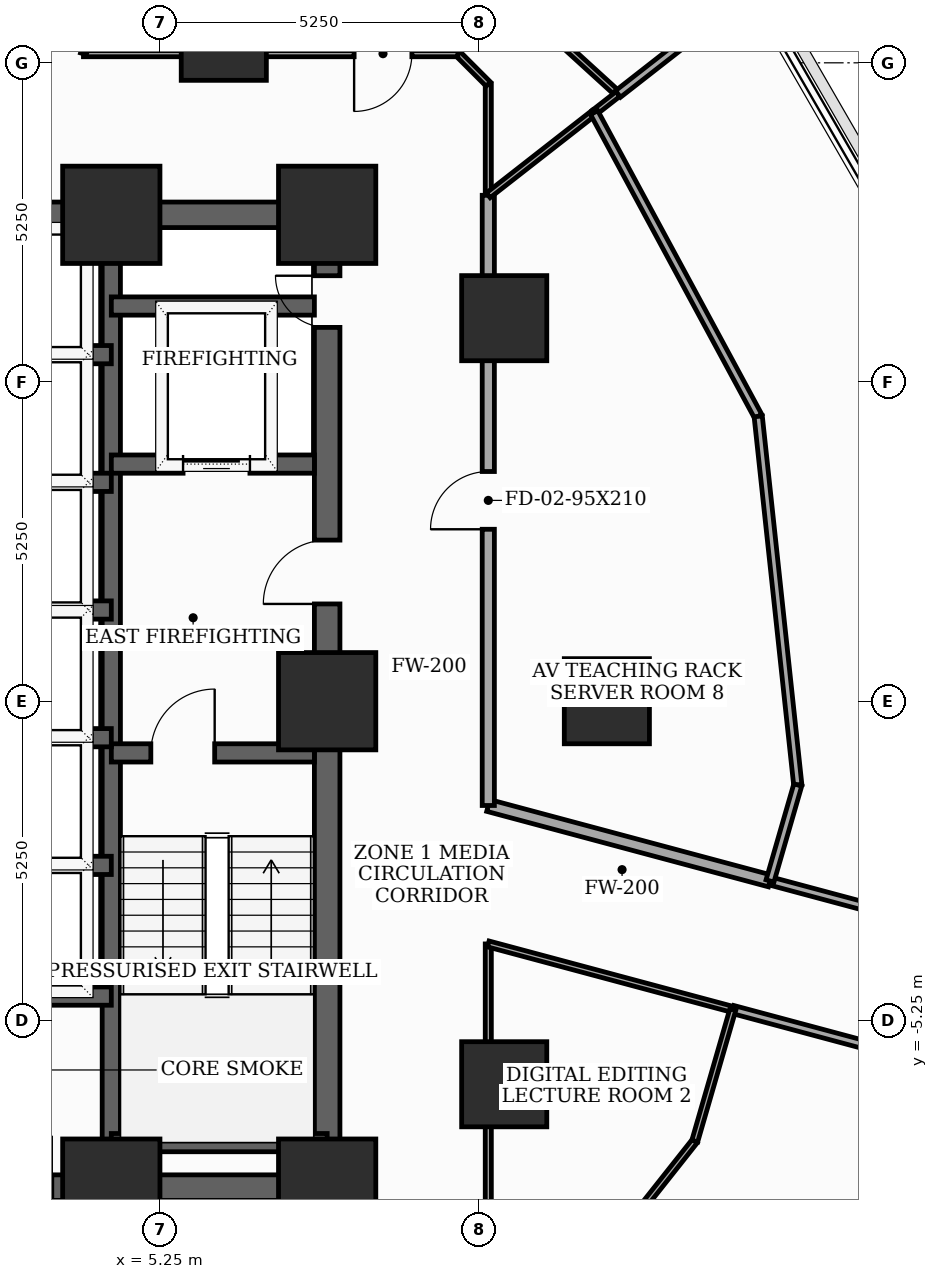
"""IFC4 building model, lengths in metres.
Left out: names, types, materials, properties, quantities, classifications, styles, units other than length and angle.
Written with IfcOpenShell. Run it as: python <this file> out.ifc"""

import sys

from ifc_helpers import new_model, si_unit, direction, frame, frame_2d, origin, origin_2d, place, context, subcontext, project, spatial, rectangle, extrude, element, fill, save


model = new_model("IFC4")
c1 = context("Model", 3, precision=1e-05, world=origin(), true_north=direction((0.0, 1.0)))
c2 = subcontext(c1, "Body", "Model", "MODEL_VIEW")
j1 = project(units=[si_unit("LENGTHUNIT", "METRE"), si_unit("PLANEANGLEUNIT", "RADIAN")], contexts=[c1])
p1 = place(None, origin())
s1 = spatial("IfcSite", under=j1, at=p1, CompositionType="ELEMENT")
p2 = place(p1, origin())
s2 = spatial("IfcBuilding", under=s1, at=p2, CompositionType="ELEMENT")
p3 = place(p2, frame((0.0, 0.0, 48.2)))
s3 = spatial("IfcBuildingStorey", under=s2, at=p3, CompositionType="ELEMENT", Elevation=48.2)
for number, where, z_axis, x_axis in (
    (1, (4.45, -8.0, 0.0), (0.0, 0.0, 1.0), (1.0, 0.0, 0.0)),
    (2, (8.0, -8.0, 0.0), (0.0, 0.0, 1.0), (1.0, 0.0, 0.0)),
    (3, (8.0, 0.0, 0.0), (0.0, 0.0, 1.0), (1.0, 0.0, 0.0)),
    (4, (8.0, 8.0, 0.0), (0.0, 0.0, 1.0), (1.0, 0.0, 0.0)),
    (5, (4.45, 8.0, 0.0), (0.0, 0.0, 1.0), (1.0, 0.0, 0.0)),
):
    element("IfcColumn", number, at=place(p3, frame(where, z_axis=z_axis, x_axis=x_axis)), inside=s3, PredefinedType="COLUMN", context=c2, shape_type="SweptSolid", body=[
        extrude(rectangle(XDim=1.6, YDim=1.6, at=origin_2d()), origin(), (0.0, 0.0, 1.0), 3.7),
    ])
for number, where, z_axis, x_axis in (
    (6, (12.6, 0.0, 0.0), (0.0, 0.0, 1.0), (1.0, 0.0, 0.0)),
    (7, (10.912, 6.3, 0.0), (0.0, 0.0, 1.0), (1.0, 0.0, 0.0)),
    (8, (6.3, 10.912, 0.0), (0.0, 0.0, 1.0), (1.0, 0.0, 0.0)),
    (9, (10.912, -6.3, 0.0), (0.0, 0.0, 1.0), (1.0, 0.0, 0.0)),
):
    element("IfcColumn", number, at=place(p3, frame(where, z_axis=z_axis, x_axis=x_axis)), inside=s3, PredefinedType="COLUMN", context=c2, shape_type="SweptSolid", body=[
        extrude(rectangle(XDim=1.4, YDim=1.4, at=origin_2d()), origin(), (0.0, 0.0, 1.0), 3.7),
    ])
p4 = place(p3, frame((8.0, -8.0, 0.0), z_axis=(0.0, 0.0, 1.0), x_axis=(0.0, 1.0, 0.0)))
e10 = element("IfcWall", 10, at=p4, inside=s3, PredefinedType="SHEAR", context=c2, shape_type="SweptSolid", body=[
    extrude(rectangle(XDim=16.0, YDim=0.42, at=frame_2d((8.0, 0.0))), origin(), (0.0, 0.0, 1.0), 3.5),
])
p5 = place(p4, frame((9.6, 0.0, 0.0)))
e11 = element("IfcOpeningElement", 11, at=p5, cuts=e10, PredefinedType="OPENING", context=c2, shape_type="SweptSolid", body=[
    extrude(rectangle(XDim=1.05, YDim=2.15, at=frame_2d((0.525, 1.075))), frame((0.0, 0.22, 0.0), z_axis=(0.0, -1.0, 0.0), x_axis=(1.0, 0.0, 0.0)), (0.0, 0.0, 1.0), 0.44),
])
p6 = place(p4, frame((14.148, 0.0, 0.0)))
e12 = element("IfcOpeningElement", 12, at=p6, cuts=e10, PredefinedType="OPENING", context=c2, shape_type="SweptSolid", body=[
    extrude(rectangle(XDim=0.85, YDim=2.02, at=frame_2d((0.425, 1.01))), frame((0.0, 0.22, 0.0), z_axis=(0.0, -1.0, 0.0), x_axis=(1.0, 0.0, 0.0)), (0.0, 0.0, 1.0), 0.44),
])
p7 = place(p3, frame((-8.0, -8.0, 0.0), z_axis=(0.0, 0.0, 1.0), x_axis=(1.0, 0.0, 0.0)))
e13 = element("IfcWall", 13, at=p7, inside=s3, PredefinedType="SHEAR", context=c2, shape_type="SweptSolid", body=[
    extrude(rectangle(XDim=16.0, YDim=0.42, at=frame_2d((8.0, 0.0))), origin(), (0.0, 0.0, 1.0), 3.5),
])
p8 = place(p7, frame((4.529, 0.0, 0.0)))
e14 = element("IfcOpeningElement", 14, at=p8, cuts=e13, PredefinedType="OPENING", context=c2, shape_type="SweptSolid", body=[
    extrude(rectangle(XDim=0.85, YDim=2.02, at=frame_2d((0.425, 1.01))), frame((0.0, 0.22, 0.0), z_axis=(0.0, -1.0, 0.0), x_axis=(1.0, 0.0, 0.0)), (0.0, 0.0, 1.0), 0.44),
])
p9 = place(p7, frame((6.49, 0.0, 0.0)))
e15 = element("IfcOpeningElement", 15, at=p9, cuts=e13, PredefinedType="OPENING", context=c2, shape_type="SweptSolid", body=[
    extrude(rectangle(XDim=0.85, YDim=2.02, at=frame_2d((0.425, 1.01))), frame((0.0, 0.22, 0.0), z_axis=(0.0, -1.0, 0.0), x_axis=(1.0, 0.0, 0.0)), (0.0, 0.0, 1.0), 0.44),
])
p10 = place(p7, frame((8.69, 0.0, 0.0)))
e16 = element("IfcOpeningElement", 16, at=p10, cuts=e13, PredefinedType="OPENING", context=c2, shape_type="SweptSolid", body=[
    extrude(rectangle(XDim=0.85, YDim=2.02, at=frame_2d((0.425, 1.01))), frame((0.0, 0.22, 0.0), z_axis=(0.0, -1.0, 0.0), x_axis=(1.0, 0.0, 0.0)), (0.0, 0.0, 1.0), 0.44),
])
p11 = place(p7, frame((10.621, 0.0, 0.0)))
e17 = element("IfcOpeningElement", 17, at=p11, cuts=e13, PredefinedType="OPENING", context=c2, shape_type="SweptSolid", body=[
    extrude(rectangle(XDim=0.85, YDim=2.02, at=frame_2d((0.425, 1.01))), frame((0.0, 0.22, 0.0), z_axis=(0.0, -1.0, 0.0), x_axis=(1.0, 0.0, 0.0)), (0.0, 0.0, 1.0), 0.44),
])
p12 = place(p3, frame((-8.0, 8.0, 0.0), z_axis=(0.0, 0.0, 1.0), x_axis=(1.0, 0.0, 0.0)))
e18 = element("IfcWall", 18, at=p12, inside=s3, PredefinedType="SHEAR", context=c2, shape_type="SweptSolid", body=[
    extrude(rectangle(XDim=16.0, YDim=0.42, at=frame_2d((8.0, 0.0))), origin(), (0.0, 0.0, 1.0), 3.5),
])
p13 = place(p12, frame((7.1, 0.0, 0.0)))
e19 = element("IfcOpeningElement", 19, at=p13, cuts=e18, PredefinedType="OPENING", context=c2, shape_type="SweptSolid", body=[
    extrude(rectangle(XDim=1.8, YDim=2.15, at=frame_2d((0.9, 1.075))), frame((0.0, 0.22, 0.0), z_axis=(0.0, -1.0, 0.0), x_axis=(1.0, 0.0, 0.0)), (0.0, 0.0, 1.0), 0.44),
])
p14 = place(p3, frame((4.45, -7.79, 0.0), z_axis=(0.0, 0.0, 1.0), x_axis=(0.0, 1.0, 0.0)))
e20 = element("IfcWall", 20, at=p14, inside=s3, PredefinedType="SHEAR", context=c2, shape_type="SweptSolid", body=[
    extrude(rectangle(XDim=15.58, YDim=0.3, at=frame_2d((7.79, 0.0))), origin(), (0.0, 0.0, 1.0), 3.5),
])
p15 = place(p3, frame((4.45, -0.85, 0.0), z_axis=(0.0, 0.0, 1.0), x_axis=(1.0, 0.0, 0.0)))
e21 = element("IfcWall", 21, at=p15, inside=s3, PredefinedType="SHEAR", context=c2, shape_type="SweptSolid", body=[
    extrude(rectangle(XDim=3.34, YDim=0.3, at=frame_2d((1.67, 0.0))), origin(), (0.0, 0.0, 1.0), 3.5),
])
p16 = place(p15, frame((0.65, 0.0, 0.0)))
e22 = element("IfcOpeningElement", 22, at=p16, cuts=e21, PredefinedType="OPENING", context=c2, shape_type="SweptSolid", body=[
    extrude(rectangle(XDim=1.05, YDim=2.15, at=frame_2d((0.525, 1.075))), frame((0.0, 0.16, 0.0), z_axis=(0.0, -1.0, 0.0), x_axis=(1.0, 0.0, 0.0)), (0.0, 0.0, 1.0), 0.32),
])
p17 = place(p3, frame((4.45, -7.26, 0.0), z_axis=(0.0, 0.0, 1.0), x_axis=(1.0, 0.0, 0.0)))
e23 = element("IfcWall", 23, at=p17, inside=s3, PredefinedType="SHEAR", context=c2, shape_type="SweptSolid", body=[
    extrude(rectangle(XDim=3.55, YDim=0.3, at=frame_2d((1.775, 0.0))), origin(), (0.0, 0.0, 1.0), 3.5),
])
p18 = place(p3, frame((4.45, 3.9, 0.0), z_axis=(0.0, 0.0, 1.0), x_axis=(1.0, 0.0, 0.0)))
e24 = element("IfcWall", 24, at=p18, inside=s3, PredefinedType="SHEAR", context=c2, shape_type="SweptSolid", body=[
    extrude(rectangle(XDim=3.34, YDim=0.3, at=frame_2d((1.67, 0.0))), origin(), (0.0, 0.0, 1.0), 3.5),
])
p19 = place(p18, frame((1.18, 0.0, 0.0)))
e25 = element("IfcOpeningElement", 25, at=p19, cuts=e24, PredefinedType="OPENING", context=c2, shape_type="SweptSolid", body=[
    extrude(rectangle(XDim=1.1, YDim=2.1, at=frame_2d((0.55, 1.05))), frame((0.0, 0.16, 0.0), z_axis=(0.0, -1.0, 0.0), x_axis=(1.0, 0.0, 0.0)), (0.0, 0.0, 1.0), 0.32),
])
p20 = place(p3, frame((4.45, 6.5, 0.0), z_axis=(0.0, 0.0, 1.0), x_axis=(1.0, 0.0, 0.0)))
e26 = element("IfcWall", 26, at=p20, inside=s3, PredefinedType="SHEAR", context=c2, shape_type="SweptSolid", body=[
    extrude(rectangle(XDim=3.34, YDim=0.3, at=frame_2d((1.67, 0.0))), origin(), (0.0, 0.0, 1.0), 3.5),
])
p21 = place(p3, frame((-4.45, -4.85, 0.0), z_axis=(0.0, 0.0, 1.0), x_axis=(1.0, 0.0, 0.0)))
e27 = element("IfcWall", 27, at=p21, inside=s3, PredefinedType="SHEAR", context=c2, shape_type="SweptSolid", body=[
    extrude(rectangle(XDim=8.9, YDim=0.3, at=frame_2d((4.45, 0.0))), origin(), (0.0, 0.0, 1.0), 3.5),
])
for number, where, z_axis, x_axis in (
    (28, (1.68, 1.5, 0.0), (0.0, 0.0, 1.0), (1.0, 0.0, 0.0)),
    (29, (1.68, 3.6, 0.0), (0.0, 0.0, 1.0), (1.0, 0.0, 0.0)),
    (30, (1.68, 5.7, 0.0), (0.0, 0.0, 1.0), (1.0, 0.0, 0.0)),
    (31, (1.68, -2.7, 0.0), (0.0, 0.0, 1.0), (1.0, 0.0, 0.0)),
    (32, (1.68, -0.6, 0.0), (0.0, 0.0, 1.0), (1.0, 0.0, 0.0)),
):
    element("IfcWall", number, at=place(p3, frame(where, z_axis=z_axis, x_axis=x_axis)), inside=s3, PredefinedType="SHEAR", context=c2, shape_type="SweptSolid", body=[
        extrude(rectangle(XDim=2.77, YDim=0.3, at=frame_2d((1.385, 0.0))), origin(), (0.0, 0.0, 1.0), 3.5),
    ])
p22 = place(p3, frame((10.65, 8.321, 0.0), z_axis=(0.0, 0.0, 1.0), x_axis=(0.0, 1.0, 0.0)))
e33 = element("IfcWall", 33, at=p22, inside=s3, PredefinedType="MOVABLE", context=c2, shape_type="SweptSolid", body=[
    extrude(rectangle(XDim=1.829, YDim=0.1, at=frame_2d((0.915, 0.0))), origin(), (0.0, 0.0, 1.0), 3.5),
])
p23 = place(p3, frame((10.65, 10.15, 0.0), z_axis=(0.0, 0.0, 1.0), x_axis=(-0.707106781187, 0.707106781187, 0.0)))
e34 = element("IfcWall", 34, at=p23, inside=s3, PredefinedType="MOVABLE", context=c2, shape_type="SweptSolid", body=[
    extrude(rectangle(XDim=0.707, YDim=0.1, at=frame_2d((0.354, 0.0))), origin(), (0.0, 0.0, 1.0), 3.5),
])
p24 = place(p3, frame((10.15, 10.65, 0.0), z_axis=(0.0, 0.0, 1.0), x_axis=(-1.0, 0.0, 0.0)))
e35 = element("IfcWall", 35, at=p24, inside=s3, PredefinedType="MOVABLE", context=c2, shape_type="SweptSolid", body=[
    extrude(rectangle(XDim=6.158, YDim=0.1, at=frame_2d((3.079, 0.0))), origin(), (0.0, 0.0, 1.0), 2.685),
])
p25 = place(p24, frame((0.757, 0.0, 0.0)))
e36 = element("IfcOpeningElement", 36, at=p25, cuts=e35, PredefinedType="OPENING", context=c2, shape_type="SweptSolid", body=[
    extrude(rectangle(XDim=0.95, YDim=2.1, at=frame_2d((0.475, 1.05))), frame((0.0, 0.06, 0.0), z_axis=(0.0, -1.0, 0.0), x_axis=(1.0, 0.0, 0.0)), (0.0, 0.0, 1.0), 0.12),
])
p26 = place(p3, frame((3.992, 10.65, 0.0), z_axis=(0.0, 0.0, 1.0), x_axis=(0.258832601786, 0.965922193685, 0.0)))
e37 = element("IfcWall", 37, at=p26, inside=s3, PredefinedType="MOVABLE", context=c2, shape_type="SweptSolid", body=[
    extrude(rectangle(XDim=4.636, YDim=0.1, at=frame_2d((2.318, 0.0))), origin(), (0.0, 0.0, 1.0), 2.785),
])
p27 = place(p3, frame((10.65, -10.15, 0.0), z_axis=(0.0, 0.0, 1.0), x_axis=(0.0, 1.0, 0.0)))
e38 = element("IfcWall", 38, at=p27, inside=s3, PredefinedType="MOVABLE", context=c2, shape_type="SweptSolid", body=[
    extrude(rectangle(XDim=6.158, YDim=0.1, at=frame_2d((3.079, 0.0))), origin(), (0.0, 0.0, 1.0), 2.785),
])
p28 = place(p27, frame((0.757, 0.0, 0.0)))
e39 = element("IfcOpeningElement", 39, at=p28, cuts=e38, PredefinedType="OPENING", context=c2, shape_type="SweptSolid", body=[
    extrude(rectangle(XDim=0.95, YDim=2.1, at=frame_2d((0.475, 1.05))), frame((0.0, 0.06, 0.0), z_axis=(0.0, -1.0, 0.0), x_axis=(1.0, 0.0, 0.0)), (0.0, 0.0, 1.0), 0.12),
])
p29 = place(p3, frame((10.65, -3.992, 0.0), z_axis=(0.0, 0.0, 1.0), x_axis=(0.965903293856, -0.258903122651, 0.0)))
e40 = element("IfcWall", 40, at=p29, inside=s3, PredefinedType="MOVABLE", context=c2, shape_type="SweptSolid", body=[
    extrude(rectangle(XDim=4.164, YDim=0.1, at=frame_2d((2.082, 0.0))), origin(), (0.0, 0.0, 1.0), 2.785),
])
p30 = place(p3, frame((14.672, -5.07, 0.0), z_axis=(0.0, 0.0, 1.0), x_axis=(0.965908991917, -0.258881863664, 0.0)))
e41 = element("IfcWall", 41, at=p30, inside=s3, PredefinedType="PARTITIONING", context=c2, shape_type="SweptSolid", body=[
    extrude(rectangle(XDim=7.115, YDim=0.135, at=frame_2d((3.558, 0.0))), origin(), (0.0, 0.0, 1.0), 2.935),
])
p31 = place(p30, frame((3.083, 0.0, 0.0)))
e42 = element("IfcOpeningElement", 42, at=p31, cuts=e41, PredefinedType="OPENING", context=c2, shape_type="SweptSolid", body=[
    extrude(rectangle(XDim=0.95, YDim=2.1, at=frame_2d((0.475, 1.05))), frame((0.0, 0.077, 0.0), z_axis=(0.0, -1.0, 0.0), x_axis=(1.0, 0.0, 0.0)), (0.0, 0.0, 1.0), 0.155),
])
p32 = place(p3, frame((22.115, -4.787, 0.0), z_axis=(0.0, 0.0, 1.0), x_axis=(-0.96591107063, 0.258874107695, 0.0)))
e43 = element("IfcWall", 43, at=p32, inside=s3, PredefinedType="PARTITIONING", context=c2, shape_type="SweptSolid", body=[
    extrude(rectangle(XDim=7.073, YDim=0.135, at=frame_2d((3.537, 0.0))), origin(), (0.0, 0.0, 1.0), 3.085),
])
p33 = place(p3, frame((15.283, -2.956, 0.0), z_axis=(0.0, 0.0, 1.0), x_axis=(-0.96594964167, 0.258730148528, 0.0)))
e44 = element("IfcWall", 44, at=p33, inside=s3, PredefinedType="SOLIDWALL", context=c2, shape_type="SweptSolid", body=[
    extrude(rectangle(XDim=4.796, YDim=0.2, at=frame_2d((2.398, 0.0))), origin(), (0.0, 0.0, 1.0), 2.785),
])
p34 = place(p3, frame((10.65, -1.715, 0.0), z_axis=(0.0, 0.0, 1.0), x_axis=(0.0, 1.0, 0.0)))
e45 = element("IfcWall", 45, at=p34, inside=s3, PredefinedType="SOLIDWALL", context=c2, shape_type="SweptSolid", body=[
    extrude(rectangle(XDim=10.036, YDim=0.2, at=frame_2d((5.018, 0.0))), origin(), (0.0, 0.0, 1.0), 2.785),
])
p35 = place(p34, frame((4.543, 0.0, 0.0)))
e46 = element("IfcOpeningElement", 46, at=p35, cuts=e45, PredefinedType="OPENING", context=c2, shape_type="SweptSolid", body=[
    extrude(rectangle(XDim=0.95, YDim=2.1, at=frame_2d((0.475, 1.05))), frame((0.0, 0.11, 0.0), z_axis=(0.0, -1.0, 0.0), x_axis=(1.0, 0.0, 0.0)), (0.0, 0.0, 1.0), 0.22),
])
p36 = place(p3, frame((12.783, 9.987, 0.0), z_axis=(0.0, 0.0, 1.0), x_axis=(-0.739244565006, 0.6734370595, 0.0)))
e47 = element("IfcWall", 47, at=p36, inside=s3, PredefinedType="MOVABLE", context=c2, shape_type="SweptSolid", body=[
    extrude(rectangle(XDim=5.88, YDim=0.1, at=frame_2d((2.94, 0.0))), origin(), (0.0, 0.0, 1.0), 2.685),
])
p37 = place(p3, frame((12.391, 9.681, 0.0), z_axis=(0.0, 0.0, 1.0), x_axis=(0.788002042991, 0.615672624243, 0.0)))
e48 = element("IfcWall", 48, at=p37, inside=s3, PredefinedType="MOVABLE", context=c2, shape_type="SweptSolid", body=[
    extrude(rectangle(XDim=0.497, YDim=0.1, at=frame_2d((0.249, 0.0))), origin(), (0.0, 0.0, 1.0), 3.5),
])
p38 = place(p3, frame((10.65, 8.321, 0.0), z_axis=(0.0, 0.0, 1.0), x_axis=(0.788124883644, 0.615515367624, 0.0)))
e49 = element("IfcWall", 49, at=p38, inside=s3, PredefinedType="MOVABLE", context=c2, shape_type="SweptSolid", body=[
    extrude(rectangle(XDim=2.209, YDim=0.1, at=frame_2d((1.104, 0.0))), origin(), (0.0, 0.0, 1.0), 3.085),
])
p39 = place(p3, frame((10.522, -11.686, 0.0), z_axis=(0.0, 0.0, 1.0), x_axis=(0.620628051287, 0.784105108997, 0.0)))
e50 = element("IfcWall", 50, at=p39, inside=s3, PredefinedType="MOVABLE", context=c2, shape_type="SweptSolid", body=[
    extrude(rectangle(XDim=5.678, YDim=0.1, at=frame_2d((2.839, 0.0))), origin(), (0.0, 0.0, 1.0), 3.5),
])
p40 = place(p3, frame((14.046, -7.234, 0.0), z_axis=(0.0, 0.0, 1.0), x_axis=(0.277997548775, 0.960581783543, 0.0)))
e51 = element("IfcWall", 51, at=p40, inside=s3, PredefinedType="MOVABLE", context=c2, shape_type="SweptSolid", body=[
    extrude(rectangle(XDim=2.253, YDim=0.1, at=frame_2d((1.126, 0.0))), origin(), (0.0, 0.0, 1.0), 3.5),
])
p41 = place(p3, frame((12.783, 9.987, 0.0), z_axis=(0.0, 0.0, 1.0), x_axis=(0.788064029995, 0.615593278576, 0.0)))
e52 = element("IfcWall", 52, at=p41, inside=s3, PredefinedType="PARTITIONING", context=c2, shape_type="SweptSolid", body=[
    extrude(rectangle(XDim=2.8, YDim=0.135, at=frame_2d((1.4, 0.0))), origin(), (0.0, 0.0, 1.0), 2.935),
])
p42 = place(p3, frame((12.391, 9.681, 0.0), z_axis=(0.0, 0.0, 1.0), x_axis=(0.475181539821, -0.879887779329, 0.0)))
e53 = element("IfcWall", 53, at=p42, inside=s3, PredefinedType="PARTITIONING", context=c2, shape_type="SweptSolid", body=[
    extrude(rectangle(XDim=5.678, YDim=0.135, at=frame_2d((2.839, 0.0))), origin(), (0.0, 0.0, 1.0), 3.5),
])
p43 = place(p3, frame((15.089, 4.685, 0.0), z_axis=(0.0, 0.0, 1.0), x_axis=(0.106756517352, -0.994285193495, 0.0)))
e54 = element("IfcWall", 54, at=p43, inside=s3, PredefinedType="PARTITIONING", context=c2, shape_type="SweptSolid", body=[
    extrude(rectangle(XDim=6.097, YDim=0.135, at=frame_2d((3.048, 0.0))), origin(), (0.0, 0.0, 1.0), 2.685),
])
p44 = place(p3, frame((15.74, -1.377, 0.0), z_axis=(0.0, 0.0, 1.0), x_axis=(-0.2780148037, -0.960576789707, 0.0)))
e55 = element("IfcWall", 55, at=p44, inside=s3, PredefinedType="PARTITIONING", context=c2, shape_type="SweptSolid", body=[
    extrude(rectangle(XDim=1.644, YDim=0.135, at=frame_2d((0.822, 0.0))), origin(), (0.0, 0.0, 1.0), 2.685),
])
p45 = place(p5, origin())
e56 = element("IfcDoor", 56, at=p45, inside=s3, OperationType="SINGLE_SWING_LEFT", PredefinedType="DOOR", context=c2, shape_type="SweptSolid", body=[
    extrude(rectangle(XDim=1.05, YDim=2.15, at=frame_2d((0.525, 1.075))), frame((0.0, 0.025, 0.0), z_axis=(0.0, -1.0, 0.0), x_axis=(1.0, 0.0, 0.0)), (0.0, 0.0, 1.0), 0.05),
])
fill(e11, e56)
p46 = place(p6, origin())
e57 = element("IfcDoor", 57, at=p46, inside=s3, OperationType="SINGLE_SWING_RIGHT", PredefinedType="TRAPDOOR", context=c2, shape_type="SweptSolid", body=[
    extrude(rectangle(XDim=0.85, YDim=2.02, at=frame_2d((0.425, 1.01))), frame((0.0, 0.025, 0.0), z_axis=(0.0, -1.0, 0.0), x_axis=(1.0, 0.0, 0.0)), (0.0, 0.0, 1.0), 0.05),
])
fill(e12, e57)
p47 = place(p16, origin())
e58 = element("IfcDoor", 58, at=p47, inside=s3, OperationType="SINGLE_SWING_RIGHT", PredefinedType="DOOR", context=c2, shape_type="SweptSolid", body=[
    extrude(rectangle(XDim=1.05, YDim=2.15, at=frame_2d((0.525, 1.075))), frame((0.0, 0.025, 0.0), z_axis=(0.0, -1.0, 0.0), x_axis=(1.0, 0.0, 0.0)), (0.0, 0.0, 1.0), 0.05),
])
fill(e22, e58)
p48 = place(p19, origin())
e59 = element("IfcDoor", 59, at=p48, inside=s3, OperationType="SLIDING_TO_LEFT", PredefinedType="DOOR", context=c2, shape_type="SweptSolid", body=[
    extrude(rectangle(XDim=1.1, YDim=2.1, at=frame_2d((0.55, 1.05))), frame((0.0, 0.025, 0.0), z_axis=(0.0, -1.0, 0.0), x_axis=(1.0, 0.0, 0.0)), (0.0, 0.0, 1.0), 0.05),
])
fill(e25, e59)
p49 = place(p25, origin())
e60 = element("IfcDoor", 60, at=p49, inside=s3, OperationType="SINGLE_SWING_RIGHT", PredefinedType="DOOR", context=c2, shape_type="SweptSolid", body=[
    extrude(rectangle(XDim=0.95, YDim=2.1, at=frame_2d((0.475, 1.05))), frame((0.0, 0.025, 0.0), z_axis=(0.0, -1.0, 0.0), x_axis=(1.0, 0.0, 0.0)), (0.0, 0.0, 1.0), 0.05),
])
fill(e36, e60)
p50 = place(p35, origin())
e61 = element("IfcDoor", 61, at=p50, inside=s3, OperationType="SINGLE_SWING_LEFT", PredefinedType="DOOR", context=c2, shape_type="SweptSolid", body=[
    extrude(rectangle(XDim=0.95, YDim=2.1, at=frame_2d((0.475, 1.05))), frame((0.0, 0.025, 0.0), z_axis=(0.0, -1.0, 0.0), x_axis=(1.0, 0.0, 0.0)), (0.0, 0.0, 1.0), 0.05),
])
fill(e46, e61)
save(model, sys.argv[1])
